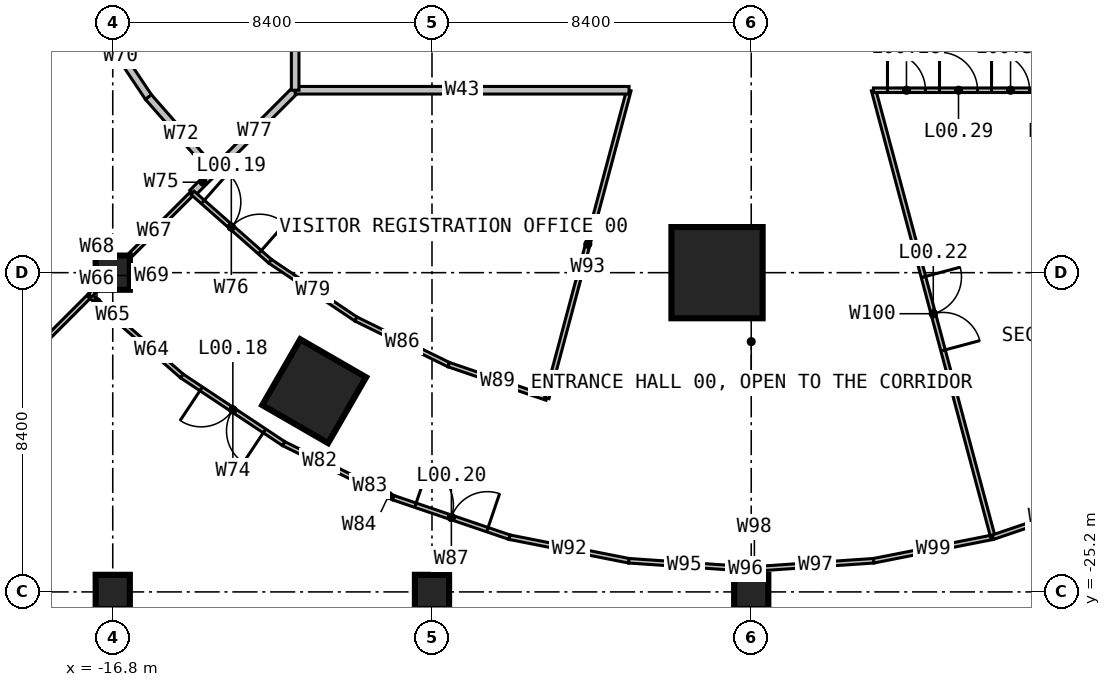
"""IFC4 building model, lengths in metres.
Left out: names, types, materials, properties, quantities, classifications, styles, units other than length and angle.
Written with IfcOpenShell. Run it as: python <this file> out.ifc"""

import sys

from ifc_helpers import new_model, si_unit, direction, frame, frame_2d, origin, origin_2d, place, context, subcontext, project, spatial, rectangle, hollow_rectangle, extrude, element, fill, save


model = new_model("IFC4")
c1 = context("Model", 3, precision=1e-05, world=origin(), true_north=direction((0.0, 1.0)))
c2 = subcontext(c1, "Body", "Model", "MODEL_VIEW")
j1 = project(units=[si_unit("LENGTHUNIT", "METRE"), si_unit("PLANEANGLEUNIT", "RADIAN")], contexts=[c1])
p1 = place(None, origin())
s1 = spatial("IfcSite", under=j1, at=p1, CompositionType="ELEMENT")
p2 = place(p1, origin())
s2 = spatial("IfcBuilding", under=s1, at=p2, CompositionType="ELEMENT")
p3 = place(p2, origin())
s3 = spatial("IfcBuildingStorey", under=s2, at=p3, CompositionType="ELEMENT", Elevation=0.0)
for number, where, z_axis, x_axis in (
    (1, (-16.8, -25.2, 0.0), (0.0, 0.0, 1.0), (1.0, 0.0, 0.0)),
    (2, (-16.8, -16.8, 0.0), (0.0, 0.0, 1.0), (1.0, 0.0, 0.0)),
    (3, (-8.4, -25.2, 0.0), (0.0, 0.0, 1.0), (1.0, 0.0, 0.0)),
    (4, (0.0, -25.2, 0.0), (0.0, 0.0, 1.0), (1.0, 0.0, 0.0)),
):
    element("IfcColumn", number, at=place(p3, frame(where, z_axis=z_axis, x_axis=x_axis)), inside=s3, PredefinedType="COLUMN", context=c2, shape_type="SweptSolid", body=[
        extrude(rectangle(XDim=0.9, YDim=0.9, at=origin_2d()), origin(), (0.0, 0.0, 1.0), 6.0),
    ])
p4 = place(p3, frame((-0.9, -16.8, 0.0), z_axis=(0.0, 0.0, 1.0), x_axis=(1.0, 0.0, 0.0)))
e5 = element("IfcColumn", 5, at=p4, inside=s3, PredefinedType="COLUMN", context=c2, shape_type="SweptSolid", body=[
    extrude(rectangle(XDim=2.4, YDim=2.4, at=origin_2d()), origin(), (0.0, 0.0, 1.0), 6.0),
])
p5 = place(p3, frame((-11.5, -19.919, 0.0), z_axis=(0.0, 0.0, 1.0), x_axis=(-0.5, -0.866025403784, 0.0)))
e6 = element("IfcColumn", 6, at=p5, inside=s3, PredefinedType="COLUMN", context=c2, shape_type="SweptSolid", body=[
    extrude(hollow_rectangle(XDim=2.0, YDim=2.0, WallThickness=0.24, at=origin_2d()), origin(), (0.0, 0.0, 1.0), 6.0),
])
p6 = place(p3, frame((-24.515, -24.515, 0.0), z_axis=(0.0, 0.0, 1.0), x_axis=(0.707106781187, 0.707106781187, 0.0)))
e7 = element("IfcWall", 7, at=p6, inside=s3, PredefinedType="PARTITIONING", context=c2, shape_type="SweptSolid", body=[
    extrude(rectangle(XDim=10.062, YDim=0.12, at=frame_2d((5.031, 0.0))), origin(), (0.0, 0.0, 1.0), 5.7),
])
p7 = place(p6, frame((4.031, 0.0, 0.0)))
e8 = element("IfcOpeningElement", 8, at=p7, cuts=e7, PredefinedType="OPENING", context=c2, shape_type="SweptSolid", body=[
    extrude(rectangle(XDim=2.0, YDim=2.4, at=frame_2d((1.0, 1.2))), frame((0.0, 0.07, 0.0), z_axis=(0.0, -1.0, 0.0), x_axis=(1.0, 0.0, 0.0)), (0.0, 0.0, 1.0), 0.14),
])
p8 = place(p3, frame((-16.57, -18.127, 0.0), z_axis=(0.0, 0.0, 1.0), x_axis=(0.752226011438, -0.658905173538, 0.0)))
e9 = element("IfcWall", 9, at=p8, inside=s3, PredefinedType="PARTITIONING", context=c2, shape_type="SweptSolid", body=[
    extrude(rectangle(XDim=2.114, YDim=0.12, at=frame_2d((1.057, 0.0))), origin(), (0.0, 0.0, 1.0), 5.7),
])
p9 = place(p3, frame((-17.03, -17.724, 0.0), z_axis=(0.0, 0.0, 1.0), x_axis=(0.752081905539, -0.65906965289, 0.0)))
e10 = element("IfcWall", 10, at=p9, inside=s3, PredefinedType="PARTITIONING", context=c2, shape_type="SweptSolid", body=[
    extrude(rectangle(XDim=0.612, YDim=0.12, at=frame_2d((0.306, 0.0))), origin(), (0.0, 0.0, 1.0), 5.3),
])
p10 = place(p3, frame((-17.4, -17.4, 0.0), z_axis=(0.0, 0.0, 1.0), x_axis=(0.751992181934, -0.659172024824, 0.0)))
e11 = element("IfcWall", 11, at=p10, inside=s3, PredefinedType="PARTITIONING", context=c2, shape_type="SweptSolid", body=[
    extrude(rectangle(XDim=0.492, YDim=0.12, at=frame_2d((0.246, 0.0))), origin(), (0.0, 0.0, 1.0), 5.7),
])
p11 = place(p3, frame((-16.72, -16.72, 0.0), z_axis=(0.0, 0.0, 1.0), x_axis=(0.707106781187, 0.707106781187, 0.0)))
e12 = element("IfcWall", 12, at=p11, inside=s3, PredefinedType="PARTITIONING", context=c2, shape_type="SweptSolid", body=[
    extrude(rectangle(XDim=2.857, YDim=0.12, at=frame_2d((1.428, 0.0))), origin(), (0.0, 0.0, 1.0), 5.7),
])
p12 = place(p3, frame((-17.4, -17.4, 0.0), z_axis=(0.0, 0.0, 1.0), x_axis=(0.707106781187, 0.707106781187, 0.0)))
e13 = element("IfcWall", 13, at=p12, inside=s3, PredefinedType="PARTITIONING", context=c2, shape_type="SweptSolid", body=[
    extrude(rectangle(XDim=0.523, YDim=0.12, at=frame_2d((0.262, 0.0))), origin(), (0.0, 0.0, 1.0), 5.7),
])
p13 = place(p3, frame((-17.03, -17.03, 0.0), z_axis=(0.0, 0.0, 1.0), x_axis=(0.707106781187, 0.707106781187, 0.0)))
e14 = element("IfcWall", 14, at=p13, inside=s3, PredefinedType="PARTITIONING", context=c2, shape_type="SweptSolid", body=[
    extrude(rectangle(XDim=0.438, YDim=0.12, at=frame_2d((0.219, 0.0))), origin(), (0.0, 0.0, 1.0), 5.3),
])
p14 = place(p3, frame((-17.32, -10.0, 0.0), z_axis=(0.0, 0.0, 1.0), x_axis=(0.556459812229, -0.83087452565, 0.0)))
e15 = element("IfcWall", 15, at=p14, inside=s3, PredefinedType="PARTITIONING", context=c2, shape_type="SweptSolid", body=[
    extrude(rectangle(XDim=2.624, YDim=0.2, at=frame_2d((1.312, 0.0))), origin(), (0.0, 0.0, 1.0), 5.7),
])
p15 = place(p3, frame((-15.86, -12.18, 0.0), z_axis=(0.0, 0.0, 1.0), x_axis=(0.659643857667, -0.751578326618, 0.0)))
e16 = element("IfcWall", 16, at=p15, inside=s3, PredefinedType="PARTITIONING", context=c2, shape_type="SweptSolid", body=[
    extrude(rectangle(XDim=2.608, YDim=0.2, at=frame_2d((1.304, 0.0))), origin(), (0.0, 0.0, 1.0), 5.7),
])
p16 = place(p3, frame((-14.98, -19.52, 0.0), z_axis=(0.0, 0.0, 1.0), x_axis=(0.832994734858, -0.553280915719, 0.0)))
e17 = element("IfcWall", 17, at=p16, inside=s3, PredefinedType="PARTITIONING", context=c2, shape_type="SweptSolid", body=[
    extrude(rectangle(XDim=3.217, YDim=0.12, at=frame_2d((1.609, 0.0))), origin(), (0.0, 0.0, 1.0), 5.7),
])
p17 = place(p16, frame((0.609, 0.0, 0.0)))
e18 = element("IfcOpeningElement", 18, at=p17, cuts=e17, PredefinedType="OPENING", context=c2, shape_type="SweptSolid", body=[
    extrude(rectangle(XDim=2.0, YDim=2.4, at=frame_2d((1.0, 1.2))), frame((0.0, 0.07, 0.0), z_axis=(0.0, -1.0, 0.0), x_axis=(1.0, 0.0, 0.0)), (0.0, 0.0, 1.0), 0.14),
])
p18 = place(p3, frame((-14.7, -14.7, 0.0), z_axis=(0.0, 0.0, 1.0), x_axis=(0.707106781187, 0.707106781187, 0.0)))
e19 = element("IfcWall", 19, at=p18, inside=s3, PredefinedType="PARTITIONING", context=c2, shape_type="SweptSolid", body=[
    extrude(rectangle(XDim=0.792, YDim=0.2, at=frame_2d((0.396, 0.0))), origin(), (0.0, 0.0, 1.0), 5.7),
])
p19 = place(p3, frame((-14.7, -14.7, 0.0), z_axis=(0.0, 0.0, 1.0), x_axis=(0.7498352366, -0.661624605009, 0.0)))
e20 = element("IfcWall", 20, at=p19, inside=s3, PredefinedType="PARTITIONING", context=c2, shape_type="SweptSolid", body=[
    extrude(rectangle(XDim=2.721, YDim=0.12, at=frame_2d((1.36, 0.0))), origin(), (0.0, 0.0, 1.0), 5.7),
])
p20 = place(p19, frame((0.36, 0.0, 0.0)))
e21 = element("IfcOpeningElement", 21, at=p20, cuts=e20, PredefinedType="OPENING", context=c2, shape_type="SweptSolid", body=[
    extrude(rectangle(XDim=2.0, YDim=2.4, at=frame_2d((1.0, 1.2))), frame((0.0, 0.07, 0.0), z_axis=(0.0, -1.0, 0.0), x_axis=(1.0, 0.0, 0.0)), (0.0, 0.0, 1.0), 0.14),
])
p21 = place(p3, frame((-14.14, -14.14, 0.0), z_axis=(0.0, 0.0, 1.0), x_axis=(0.707106781187, 0.707106781187, 0.0)))
e22 = element("IfcWall", 22, at=p21, inside=s3, PredefinedType="PARTITIONING", context=c2, shape_type="SweptSolid", body=[
    extrude(rectangle(XDim=3.026, YDim=0.2, at=frame_2d((1.513, 0.0))), origin(), (0.0, 0.0, 1.0), 5.7),
])
p22 = place(p3, frame((-12.66, -16.5, 0.0), z_axis=(0.0, 0.0, 1.0), x_axis=(0.82978173513, -0.55808805044, 0.0)))
e23 = element("IfcWall", 23, at=p22, inside=s3, PredefinedType="PARTITIONING", context=c2, shape_type="SweptSolid", body=[
    extrude(rectangle(XDim=2.724, YDim=0.12, at=frame_2d((1.362, 0.0))), origin(), (0.0, 0.0, 1.0), 5.7),
])
p23 = place(p3, frame((-12.3, -21.3, 0.0), z_axis=(0.0, 0.0, 1.0), x_axis=(0.896913641042, -0.442205744551, 0.0)))
e24 = element("IfcWall", 24, at=p23, inside=s3, PredefinedType="PARTITIONING", context=c2, shape_type="SweptSolid", body=[
    extrude(rectangle(XDim=2.109, YDim=0.12, at=frame_2d((1.055, 0.0))), origin(), (0.0, 0.0, 1.0), 5.7),
])
p24 = place(p3, frame((-10.408, -22.233, 0.0), z_axis=(0.0, 0.0, 1.0), x_axis=(0.896921584296, -0.442189633103, 0.0)))
e25 = element("IfcWall", 25, at=p24, inside=s3, PredefinedType="PARTITIONING", context=c2, shape_type="SweptSolid", body=[
    extrude(rectangle(XDim=0.837, YDim=0.12, at=frame_2d((0.418, 0.0))), origin(), (0.0, 0.0, 1.0), 5.3),
])
p25 = place(p3, frame((-9.658, -22.603, 0.0), z_axis=(0.0, 0.0, 1.0), x_axis=(0.896990941369, -0.442048923878, 0.0)))
e26 = element("IfcWall", 26, at=p25, inside=s3, PredefinedType="PARTITIONING", context=c2, shape_type="SweptSolid", body=[
    extrude(rectangle(XDim=0.265, YDim=0.12, at=frame_2d((0.133, 0.0))), origin(), (0.0, 0.0, 1.0), 5.7),
])
p26 = place(p3, frame((-10.4, -18.02, 0.0), z_axis=(0.0, 0.0, 1.0), x_axis=(0.897352880703, -0.441313729103, 0.0)))
e27 = element("IfcWall", 27, at=p26, inside=s3, PredefinedType="PARTITIONING", context=c2, shape_type="SweptSolid", body=[
    extrude(rectangle(XDim=2.719, YDim=0.12, at=frame_2d((1.359, 0.0))), origin(), (0.0, 0.0, 1.0), 5.7),
])
p27 = place(p3, frame((-9.42, -22.72, 0.0), z_axis=(0.0, 0.0, 1.0), x_axis=(0.946800830057, -0.321820117773, 0.0)))
e28 = element("IfcWall", 28, at=p27, inside=s3, PredefinedType="PARTITIONING", context=c2, shape_type="SweptSolid", body=[
    extrude(rectangle(XDim=3.232, YDim=0.12, at=frame_2d((1.616, 0.0))), origin(), (0.0, 0.0, 1.0), 5.7),
])
p28 = place(p27, frame((0.616, 0.0, 0.0)))
e29 = element("IfcOpeningElement", 29, at=p28, cuts=e28, PredefinedType="OPENING", context=c2, shape_type="SweptSolid", body=[
    extrude(rectangle(XDim=2.0, YDim=2.4, at=frame_2d((1.0, 1.2))), frame((0.0, 0.07, 0.0), z_axis=(0.0, -1.0, 0.0), x_axis=(1.0, 0.0, 0.0)), (0.0, 0.0, 1.0), 0.14),
])
p29 = place(p3, frame((-7.96, -19.22, 0.0), z_axis=(0.0, 0.0, 1.0), x_axis=(0.946448006399, -0.322856270162, 0.0)))
e30 = element("IfcWall", 30, at=p29, inside=s3, PredefinedType="PARTITIONING", context=c2, shape_type="SweptSolid", body=[
    extrude(rectangle(XDim=2.726, YDim=0.12, at=frame_2d((1.363, 0.0))), origin(), (0.0, 0.0, 1.0), 5.7),
])
p30 = place(p3, frame((-6.36, -23.76, 0.0), z_axis=(0.0, 0.0, 1.0), x_axis=(0.98106754531, -0.193665876033, 0.0)))
e31 = element("IfcWall", 31, at=p30, inside=s3, PredefinedType="PARTITIONING", context=c2, shape_type="SweptSolid", body=[
    extrude(rectangle(XDim=3.201, YDim=0.12, at=frame_2d((1.6, 0.0))), origin(), (0.0, 0.0, 1.0), 5.7),
])
p31 = place(p3, frame((-5.38, -20.1, 0.0), z_axis=(0.0, 0.0, 1.0), x_axis=(0.257649962154, 0.966238323087, 0.0)))
e32 = element("IfcWall", 32, at=p31, inside=s3, PredefinedType="PARTITIONING", context=c2, shape_type="SweptSolid", body=[
    extrude(rectangle(XDim=8.383, YDim=0.12, at=frame_2d((4.191, 0.0))), origin(), (0.0, 0.0, 1.0), 5.7),
])
p32 = place(p3, frame((-3.22, -24.38, 0.0), z_axis=(0.0, 0.0, 1.0), x_axis=(0.997672751552, -0.068184168332, 0.0)))
e33 = element("IfcWall", 33, at=p32, inside=s3, PredefinedType="PARTITIONING", context=c2, shape_type="SweptSolid", body=[
    extrude(rectangle(XDim=2.929, YDim=0.12, at=frame_2d((1.464, 0.0))), origin(), (0.0, 0.0, 1.0), 5.7),
])
p33 = place(p3, frame((-0.298, -24.58, 0.0), z_axis=(0.0, 0.0, 1.0), x_axis=(0.997638063988, -0.068689833914, 0.0)))
e34 = element("IfcWall", 34, at=p33, inside=s3, PredefinedType="PARTITIONING", context=c2, shape_type="SweptSolid", body=[
    extrude(rectangle(XDim=0.299, YDim=0.12, at=frame_2d((0.149, 0.0))), origin(), (0.0, 0.0, 1.0), 5.3),
])
p34 = place(p3, frame((0.166, -24.589, 0.0), z_axis=(0.0, 0.0, 1.0), x_axis=(0.997672608774, 0.068186257434, 0.0)))
e35 = element("IfcWall", 35, at=p34, inside=s3, PredefinedType="PARTITIONING", context=c2, shape_type="SweptSolid", body=[
    extrude(rectangle(XDim=3.061, YDim=0.12, at=frame_2d((1.531, 0.0))), origin(), (0.0, 0.0, 1.0), 5.7),
])
p35 = place(p3, frame((0.0, -24.6, 0.0), z_axis=(0.0, 0.0, 1.0), x_axis=(0.997612909128, 0.069054207259, 0.0)))
e36 = element("IfcWall", 36, at=p35, inside=s3, PredefinedType="PARTITIONING", context=c2, shape_type="SweptSolid", body=[
    extrude(rectangle(XDim=0.166, YDim=0.12, at=frame_2d((0.083, 0.0))), origin(), (0.0, 0.0, 1.0), 5.3),
])
p36 = place(p3, frame((3.22, -24.38, 0.0), z_axis=(0.0, 0.0, 1.0), x_axis=(0.98106754531, 0.193665876033, 0.0)))
e37 = element("IfcWall", 37, at=p36, inside=s3, PredefinedType="PARTITIONING", context=c2, shape_type="SweptSolid", body=[
    extrude(rectangle(XDim=3.201, YDim=0.12, at=frame_2d((1.6, 0.0))), origin(), (0.0, 0.0, 1.0), 5.7),
])
p37 = place(p3, frame((3.22, -12.0, 0.0), z_axis=(0.0, 0.0, 1.0), x_axis=(0.257979728484, -0.966150329758, 0.0)))
e38 = element("IfcWall", 38, at=p37, inside=s3, PredefinedType="PARTITIONING", context=c2, shape_type="SweptSolid", body=[
    extrude(rectangle(XDim=12.172, YDim=0.12, at=frame_2d((6.086, 0.0))), origin(), (0.0, 0.0, 1.0), 5.7),
])
p38 = place(p37, frame((5.086, 0.0, 0.0)))
e39 = element("IfcOpeningElement", 39, at=p38, cuts=e38, PredefinedType="OPENING", context=c2, shape_type="SweptSolid", body=[
    extrude(rectangle(XDim=2.0, YDim=2.4, at=frame_2d((1.0, 1.2))), frame((0.0, 0.07, 0.0), z_axis=(0.0, -1.0, 0.0), x_axis=(1.0, 0.0, 0.0)), (0.0, 0.0, 1.0), 0.14),
])
p39 = place(p3, frame((6.36, -23.76, 0.0), z_axis=(0.0, 0.0, 1.0), x_axis=(0.946800830057, 0.321820117773, 0.0)))
e40 = element("IfcWall", 40, at=p39, inside=s3, PredefinedType="PARTITIONING", context=c2, shape_type="SweptSolid", body=[
    extrude(rectangle(XDim=3.232, YDim=0.12, at=frame_2d((1.616, 0.0))), origin(), (0.0, 0.0, 1.0), 5.7),
])
p40 = place(p3, frame((-12.0, -12.0, 0.0), z_axis=(0.0, 0.0, 1.0), x_axis=(1.0, 0.0, 0.0)))
e41 = element("IfcWall", 41, at=p40, inside=s3, PredefinedType="PARTITIONING", context=c2, shape_type="SweptSolid", body=[
    extrude(rectangle(XDim=8.785, YDim=0.2, at=frame_2d((4.392, 0.0))), origin(), (0.0, 0.0, 1.0), 5.7),
])
p41 = place(p3, frame((-12.0, -3.215, 0.0), z_axis=(0.0, 0.0, 1.0), x_axis=(0.0, -1.0, 0.0)))
e42 = element("IfcWall", 42, at=p41, inside=s3, PredefinedType="PARTITIONING", context=c2, shape_type="SweptSolid", body=[
    extrude(rectangle(XDim=8.785, YDim=0.2, at=frame_2d((4.392, 0.0))), origin(), (0.0, 0.0, 1.0), 5.7),
])
p42 = place(p41, frame((3.892, 0.0, 0.0)))
e43 = element("IfcOpeningElement", 43, at=p42, cuts=e42, PredefinedType="OPENING", context=c2, shape_type="SweptSolid", body=[
    extrude(rectangle(XDim=1.0, YDim=2.2, at=frame_2d((0.5, 1.1))), frame((0.0, 0.11, 0.0), z_axis=(0.0, -1.0, 0.0), x_axis=(1.0, 0.0, 0.0)), (0.0, 0.0, 1.0), 0.22),
])
p43 = place(p3, frame((3.215, -12.0, 0.0), z_axis=(0.0, 0.0, 1.0), x_axis=(1.0, 0.0, 0.0)))
e44 = element("IfcWall", 44, at=p43, inside=s3, PredefinedType="PARTITIONING", context=c2, shape_type="SweptSolid", body=[
    extrude(rectangle(XDim=8.785, YDim=0.12, at=frame_2d((4.392, 0.0))), origin(), (0.0, 0.0, 1.0), 5.7),
])
p44 = place(p43, frame((0.369, 0.0, 0.0)))
e45 = element("IfcOpeningElement", 45, at=p44, cuts=e44, PredefinedType="OPENING", context=c2, shape_type="SweptSolid", body=[
    extrude(rectangle(XDim=1.0, YDim=2.2, at=frame_2d((0.5, 1.1))), frame((0.0, 0.07, 0.0), z_axis=(0.0, -1.0, 0.0), x_axis=(1.0, 0.0, 0.0)), (0.0, 0.0, 1.0), 0.14),
])
p45 = place(p43, frame((1.739, 0.0, 0.0)))
e46 = element("IfcOpeningElement", 46, at=p45, cuts=e44, PredefinedType="OPENING", context=c2, shape_type="SweptSolid", body=[
    extrude(rectangle(XDim=1.0, YDim=2.2, at=frame_2d((0.5, 1.1))), frame((0.0, 0.07, 0.0), z_axis=(0.0, -1.0, 0.0), x_axis=(1.0, 0.0, 0.0)), (0.0, 0.0, 1.0), 0.14),
])
p46 = place(p43, frame((3.108, 0.0, 0.0)))
e47 = element("IfcOpeningElement", 47, at=p46, cuts=e44, PredefinedType="OPENING", context=c2, shape_type="SweptSolid", body=[
    extrude(rectangle(XDim=1.0, YDim=2.2, at=frame_2d((0.5, 1.1))), frame((0.0, 0.07, 0.0), z_axis=(0.0, -1.0, 0.0), x_axis=(1.0, 0.0, 0.0)), (0.0, 0.0, 1.0), 0.14),
])
p47 = place(p43, frame((4.477, 0.0, 0.0)))
e48 = element("IfcOpeningElement", 48, at=p47, cuts=e44, PredefinedType="OPENING", context=c2, shape_type="SweptSolid", body=[
    extrude(rectangle(XDim=1.0, YDim=2.2, at=frame_2d((0.5, 1.1))), frame((0.0, 0.07, 0.0), z_axis=(0.0, -1.0, 0.0), x_axis=(1.0, 0.0, 0.0)), (0.0, 0.0, 1.0), 0.14),
])
p48 = place(p43, frame((5.846, 0.0, 0.0)))
e49 = element("IfcOpeningElement", 49, at=p48, cuts=e44, PredefinedType="OPENING", context=c2, shape_type="SweptSolid", body=[
    extrude(rectangle(XDim=1.0, YDim=2.2, at=frame_2d((0.5, 1.1))), frame((0.0, 0.07, 0.0), z_axis=(0.0, -1.0, 0.0), x_axis=(1.0, 0.0, 0.0)), (0.0, 0.0, 1.0), 0.14),
])
p49 = place(p43, frame((7.215, 0.0, 0.0)))
e50 = element("IfcOpeningElement", 50, at=p49, cuts=e44, PredefinedType="OPENING", context=c2, shape_type="SweptSolid", body=[
    extrude(rectangle(XDim=1.2, YDim=2.2, at=frame_2d((0.6, 1.1))), frame((0.0, 0.07, 0.0), z_axis=(0.0, -1.0, 0.0), x_axis=(1.0, 0.0, 0.0)), (0.0, 0.0, 1.0), 0.14),
])
p50 = place(p17, frame((2.0, 0.0, 0.0), z_axis=(0.0, 0.0, 1.0), x_axis=(-1.0, 0.0, 0.0)))
e51 = element("IfcDoor", 51, at=p50, inside=s3, OperationType="DOUBLE_DOOR_SINGLE_SWING", PredefinedType="DOOR", context=c2, shape_type="SweptSolid", body=[
    extrude(rectangle(XDim=2.0, YDim=2.4, at=frame_2d((1.0, 1.2))), frame((0.0, 0.025, 0.0), z_axis=(0.0, -1.0, 0.0), x_axis=(1.0, 0.0, 0.0)), (0.0, 0.0, 1.0), 0.05),
])
fill(e18, e51)
p51 = place(p20, origin())
e52 = element("IfcDoor", 52, at=p51, inside=s3, OperationType="DOUBLE_DOOR_SINGLE_SWING", PredefinedType="DOOR", context=c2, shape_type="SweptSolid", body=[
    extrude(rectangle(XDim=2.0, YDim=2.4, at=frame_2d((1.0, 1.2))), frame((0.0, 0.025, 0.0), z_axis=(0.0, -1.0, 0.0), x_axis=(1.0, 0.0, 0.0)), (0.0, 0.0, 1.0), 0.05),
])
fill(e21, e52)
p52 = place(p28, origin())
e53 = element("IfcDoor", 53, at=p52, inside=s3, OperationType="DOUBLE_DOOR_SINGLE_SWING", PredefinedType="DOOR", context=c2, shape_type="SweptSolid", body=[
    extrude(rectangle(XDim=2.0, YDim=2.4, at=frame_2d((1.0, 1.2))), frame((0.0, 0.025, 0.0), z_axis=(0.0, -1.0, 0.0), x_axis=(1.0, 0.0, 0.0)), (0.0, 0.0, 1.0), 0.05),
])
fill(e29, e53)
p53 = place(p38, origin())
e54 = element("IfcDoor", 54, at=p53, inside=s3, OperationType="DOUBLE_DOOR_SINGLE_SWING", PredefinedType="DOOR", context=c2, shape_type="SweptSolid", body=[
    extrude(rectangle(XDim=2.0, YDim=2.4, at=frame_2d((1.0, 1.2))), frame((0.0, 0.025, 0.0), z_axis=(0.0, -1.0, 0.0), x_axis=(1.0, 0.0, 0.0)), (0.0, 0.0, 1.0), 0.05),
])
fill(e39, e54)
p54 = place(p44, origin())
e55 = element("IfcDoor", 55, at=p54, inside=s3, OperationType="SINGLE_SWING_LEFT", PredefinedType="GATE", context=c2, shape_type="SweptSolid", body=[
    extrude(rectangle(XDim=1.0, YDim=2.2, at=frame_2d((0.5, 1.1))), frame((0.0, 0.025, 0.0), z_axis=(0.0, -1.0, 0.0), x_axis=(1.0, 0.0, 0.0)), (0.0, 0.0, 1.0), 0.05),
])
fill(e45, e55)
p55 = place(p45, origin())
e56 = element("IfcDoor", 56, at=p55, inside=s3, OperationType="SINGLE_SWING_LEFT", PredefinedType="GATE", context=c2, shape_type="SweptSolid", body=[
    extrude(rectangle(XDim=1.0, YDim=2.2, at=frame_2d((0.5, 1.1))), frame((0.0, 0.025, 0.0), z_axis=(0.0, -1.0, 0.0), x_axis=(1.0, 0.0, 0.0)), (0.0, 0.0, 1.0), 0.05),
])
fill(e46, e56)
p56 = place(p46, origin())
e57 = element("IfcDoor", 57, at=p56, inside=s3, OperationType="SINGLE_SWING_LEFT", PredefinedType="GATE", context=c2, shape_type="SweptSolid", body=[
    extrude(rectangle(XDim=1.0, YDim=2.2, at=frame_2d((0.5, 1.1))), frame((0.0, 0.025, 0.0), z_axis=(0.0, -1.0, 0.0), x_axis=(1.0, 0.0, 0.0)), (0.0, 0.0, 1.0), 0.05),
])
fill(e47, e57)
save(model, sys.argv[1])
